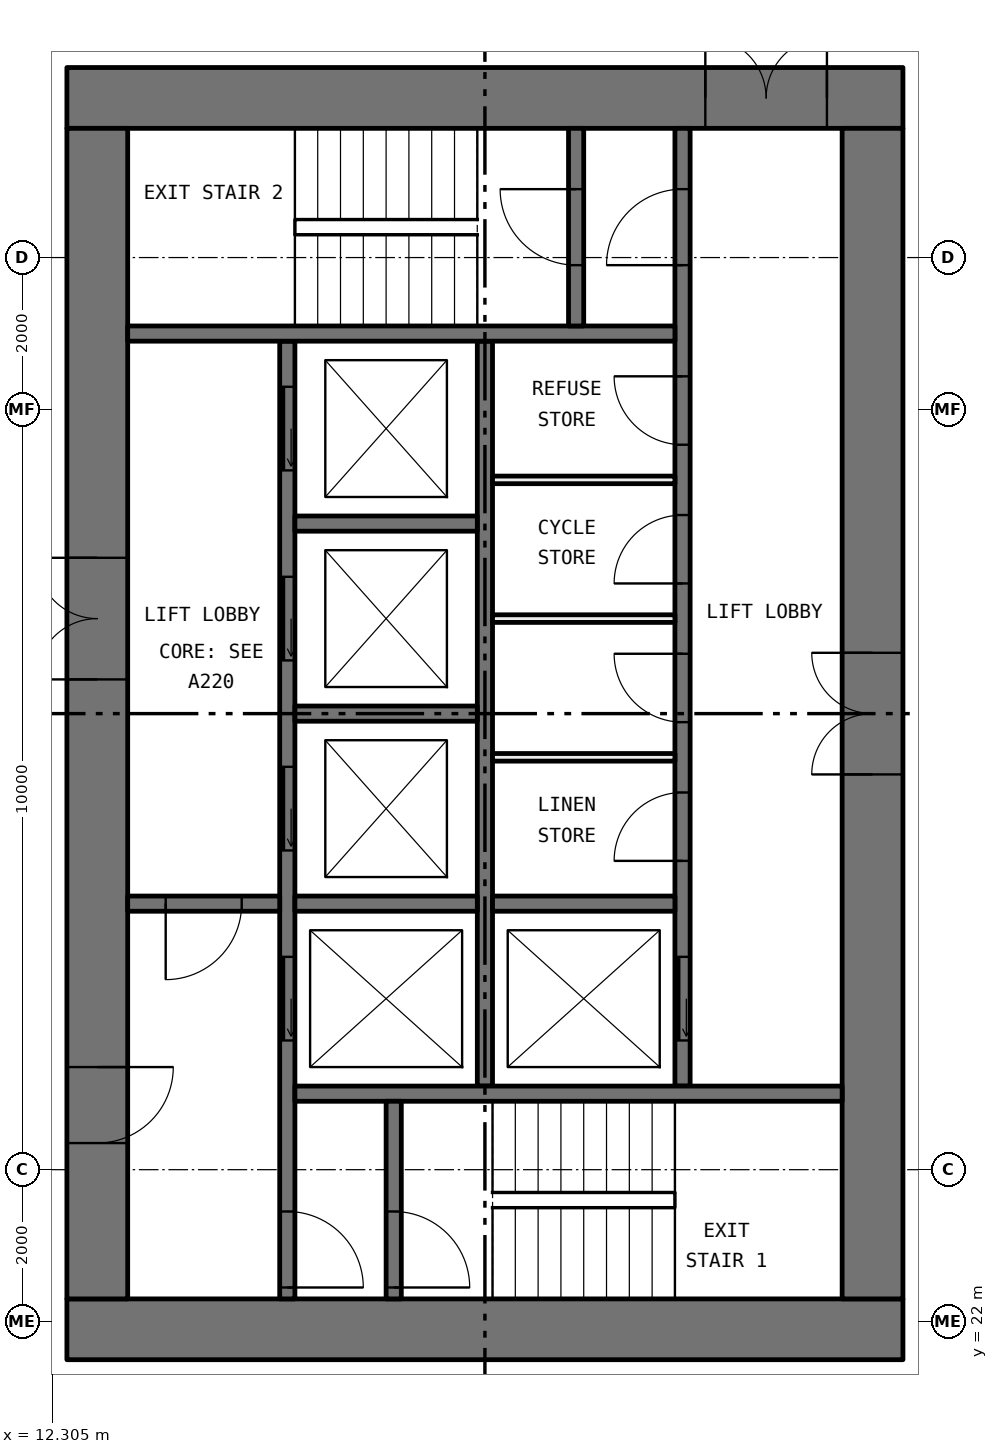
"""IFC4 building model, lengths in metres.
Left out: names, types, materials, properties, quantities, classifications, styles, units other than length and angle.
Written with IfcOpenShell. Run it as: python <this file> out.ifc"""

import sys

from ifc_helpers import new_model, si_unit, direction, frame, frame_2d, origin, place, context, subcontext, project, spatial, rectangle, extrude, element, fill, save


model = new_model("IFC4")
c1 = context("Model", 3, precision=1e-05, world=origin(), true_north=direction((0.0, 1.0)))
c2 = subcontext(c1, "Body", "Model", "MODEL_VIEW")
j1 = project(units=[si_unit("LENGTHUNIT", "METRE"), si_unit("PLANEANGLEUNIT", "RADIAN")], contexts=[c1])
p1 = place(None, origin())
s1 = spatial("IfcSite", under=j1, at=p1, CompositionType="ELEMENT")
p2 = place(p1, origin())
s2 = spatial("IfcBuilding", under=s1, at=p2, CompositionType="ELEMENT")
p3 = place(p2, frame((0.0, 0.0, 78.3)))
s3 = spatial("IfcBuildingStorey", under=s2, at=p3, CompositionType="ELEMENT", Elevation=78.3)
p4 = place(p3, frame((12.5, 21.9, 0.0), z_axis=(0.0, 0.0, 1.0), x_axis=(1.0, 0.0, 0.0)))
e1 = element("IfcWall", 1, at=p4, inside=s3, PredefinedType="SHEAR", context=c2, shape_type="SweptSolid", body=[
    extrude(rectangle(XDim=11.0, YDim=0.8, at=frame_2d((5.5, 0.0))), origin(), (0.0, 0.0, 1.0), 3.05),
])
p5 = place(p3, frame((12.5, 38.1, 0.0), z_axis=(0.0, 0.0, 1.0), x_axis=(1.0, 0.0, 0.0)))
e2 = element("IfcWall", 2, at=p5, inside=s3, PredefinedType="SHEAR", context=c2, shape_type="SweptSolid", body=[
    extrude(rectangle(XDim=11.0, YDim=0.8, at=frame_2d((5.5, 0.0))), origin(), (0.0, 0.0, 1.0), 3.05),
])
p6 = place(p5, frame((8.4, 0.0, 0.0)))
e3 = element("IfcOpeningElement", 3, at=p6, cuts=e2, PredefinedType="OPENING", context=c2, shape_type="SweptSolid", body=[
    extrude(rectangle(XDim=1.6, YDim=2.1, at=frame_2d((0.8, 1.05))), frame((0.0, 0.41, 0.0), z_axis=(0.0, -1.0, 0.0), x_axis=(1.0, 0.0, 0.0)), (0.0, 0.0, 1.0), 0.82),
])
p7 = place(p3, frame((12.9, 22.3, 0.0), z_axis=(0.0, 0.0, 1.0), x_axis=(0.0, 1.0, 0.0)))
e4 = element("IfcWall", 4, at=p7, inside=s3, PredefinedType="SHEAR", context=c2, shape_type="SweptSolid", body=[
    extrude(rectangle(XDim=15.4, YDim=0.8, at=frame_2d((7.7, 0.0))), origin(), (0.0, 0.0, 1.0), 3.05),
])
p8 = place(p7, frame((8.15, 0.0, 0.0)))
e5 = element("IfcOpeningElement", 5, at=p8, cuts=e4, PredefinedType="OPENING", context=c2, shape_type="SweptSolid", body=[
    extrude(rectangle(XDim=1.6, YDim=2.1, at=frame_2d((0.8, 1.05))), frame((0.0, 0.41, 0.0), z_axis=(0.0, -1.0, 0.0), x_axis=(1.0, 0.0, 0.0)), (0.0, 0.0, 1.0), 0.82),
])
p9 = place(p7, frame((2.05, 0.0, 0.0)))
e6 = element("IfcOpeningElement", 6, at=p9, cuts=e4, PredefinedType="OPENING", context=c2, shape_type="SweptSolid", body=[
    extrude(rectangle(XDim=1.0, YDim=2.1, at=frame_2d((0.5, 1.05))), frame((0.0, 0.41, 0.0), z_axis=(0.0, -1.0, 0.0), x_axis=(1.0, 0.0, 0.0)), (0.0, 0.0, 1.0), 0.82),
])
p10 = place(p3, frame((23.1, 22.3, 0.0), z_axis=(0.0, 0.0, 1.0), x_axis=(0.0, 1.0, 0.0)))
e7 = element("IfcWall", 7, at=p10, inside=s3, PredefinedType="SHEAR", context=c2, shape_type="SweptSolid", body=[
    extrude(rectangle(XDim=15.4, YDim=0.8, at=frame_2d((7.7, 0.0))), origin(), (0.0, 0.0, 1.0), 3.05),
])
p11 = place(p10, frame((6.9, 0.0, 0.0)))
e8 = element("IfcOpeningElement", 8, at=p11, cuts=e7, PredefinedType="OPENING", context=c2, shape_type="SweptSolid", body=[
    extrude(rectangle(XDim=1.6, YDim=2.1, at=frame_2d((0.8, 1.05))), frame((0.0, 0.41, 0.0), z_axis=(0.0, -1.0, 0.0), x_axis=(1.0, 0.0, 0.0)), (0.0, 0.0, 1.0), 0.82),
])
p12 = place(p3, frame((15.4, 22.3, 0.0), z_axis=(0.0, 0.0, 1.0), x_axis=(0.0, 1.0, 0.0)))
e9 = element("IfcWall", 9, at=p12, inside=s3, PredefinedType="SOLIDWALL", context=c2, shape_type="SweptSolid", body=[
    extrude(rectangle(XDim=12.6, YDim=0.2, at=frame_2d((6.3, 0.0))), origin(), (0.0, 0.0, 1.0), 3.05),
])
p13 = place(p12, frame((3.4, 0.0, 0.0)))
e10 = element("IfcOpeningElement", 10, at=p13, cuts=e9, PredefinedType="OPENING", context=c2, shape_type="SweptSolid", body=[
    extrude(rectangle(XDim=1.1, YDim=2.1, at=frame_2d((0.55, 1.05))), frame((0.0, 0.11, 0.0), z_axis=(0.0, -1.0, 0.0), x_axis=(1.0, 0.0, 0.0)), (0.0, 0.0, 1.0), 0.22),
])
p14 = place(p12, frame((5.9, 0.0, 0.0)))
e11 = element("IfcOpeningElement", 11, at=p14, cuts=e9, PredefinedType="OPENING", context=c2, shape_type="SweptSolid", body=[
    extrude(rectangle(XDim=1.1, YDim=2.1, at=frame_2d((0.55, 1.05))), frame((0.0, 0.11, 0.0), z_axis=(0.0, -1.0, 0.0), x_axis=(1.0, 0.0, 0.0)), (0.0, 0.0, 1.0), 0.22),
])
p15 = place(p12, frame((8.4, 0.0, 0.0)))
e12 = element("IfcOpeningElement", 12, at=p15, cuts=e9, PredefinedType="OPENING", context=c2, shape_type="SweptSolid", body=[
    extrude(rectangle(XDim=1.1, YDim=2.1, at=frame_2d((0.55, 1.05))), frame((0.0, 0.11, 0.0), z_axis=(0.0, -1.0, 0.0), x_axis=(1.0, 0.0, 0.0)), (0.0, 0.0, 1.0), 0.22),
])
p16 = place(p12, frame((10.9, 0.0, 0.0)))
e13 = element("IfcOpeningElement", 13, at=p16, cuts=e9, PredefinedType="OPENING", context=c2, shape_type="SweptSolid", body=[
    extrude(rectangle(XDim=1.1, YDim=2.1, at=frame_2d((0.55, 1.05))), frame((0.0, 0.11, 0.0), z_axis=(0.0, -1.0, 0.0), x_axis=(1.0, 0.0, 0.0)), (0.0, 0.0, 1.0), 0.22),
])
p17 = place(p12, frame((0.15, 0.0, 0.0)))
e14 = element("IfcOpeningElement", 14, at=p17, cuts=e9, PredefinedType="OPENING", context=c2, shape_type="SweptSolid", body=[
    extrude(rectangle(XDim=1.0, YDim=2.1, at=frame_2d((0.5, 1.05))), frame((0.0, 0.11, 0.0), z_axis=(0.0, -1.0, 0.0), x_axis=(1.0, 0.0, 0.0)), (0.0, 0.0, 1.0), 0.22),
])
p18 = place(p3, frame((20.6, 25.1, 0.0), z_axis=(0.0, 0.0, 1.0), x_axis=(0.0, 1.0, 0.0)))
e15 = element("IfcWall", 15, at=p18, inside=s3, PredefinedType="SOLIDWALL", context=c2, shape_type="SweptSolid", body=[
    extrude(rectangle(XDim=12.6, YDim=0.2, at=frame_2d((6.3, 0.0))), origin(), (0.0, 0.0, 1.0), 3.05),
])
p19 = place(p18, frame((0.6, 0.0, 0.0)))
e16 = element("IfcOpeningElement", 16, at=p19, cuts=e15, PredefinedType="OPENING", context=c2, shape_type="SweptSolid", body=[
    extrude(rectangle(XDim=1.1, YDim=2.1, at=frame_2d((0.55, 1.05))), frame((0.0, 0.11, 0.0), z_axis=(0.0, -1.0, 0.0), x_axis=(1.0, 0.0, 0.0)), (0.0, 0.0, 1.0), 0.22),
])
p20 = place(p18, frame((10.8, 0.0, 0.0)))
e17 = element("IfcOpeningElement", 17, at=p20, cuts=e15, PredefinedType="OPENING", context=c2, shape_type="SweptSolid", body=[
    extrude(rectangle(XDim=1.0, YDim=2.1, at=frame_2d((0.5, 1.05))), frame((0.0, 0.11, 0.0), z_axis=(0.0, -1.0, 0.0), x_axis=(1.0, 0.0, 0.0)), (0.0, 0.0, 1.0), 0.22),
])
p21 = place(p18, frame((2.962, 0.0, 0.0)))
e18 = element("IfcOpeningElement", 18, at=p21, cuts=e15, PredefinedType="OPENING", context=c2, shape_type="SweptSolid", body=[
    extrude(rectangle(XDim=0.9, YDim=2.1, at=frame_2d((0.45, 1.05))), frame((0.0, 0.11, 0.0), z_axis=(0.0, -1.0, 0.0), x_axis=(1.0, 0.0, 0.0)), (0.0, 0.0, 1.0), 0.22),
])
p22 = place(p18, frame((4.788, 0.0, 0.0)))
e19 = element("IfcOpeningElement", 19, at=p22, cuts=e15, PredefinedType="OPENING", context=c2, shape_type="SweptSolid", body=[
    extrude(rectangle(XDim=0.9, YDim=2.1, at=frame_2d((0.45, 1.05))), frame((0.0, 0.11, 0.0), z_axis=(0.0, -1.0, 0.0), x_axis=(1.0, 0.0, 0.0)), (0.0, 0.0, 1.0), 0.22),
])
p23 = place(p18, frame((6.613, 0.0, 0.0)))
e20 = element("IfcOpeningElement", 20, at=p23, cuts=e15, PredefinedType="OPENING", context=c2, shape_type="SweptSolid", body=[
    extrude(rectangle(XDim=0.9, YDim=2.1, at=frame_2d((0.45, 1.05))), frame((0.0, 0.11, 0.0), z_axis=(0.0, -1.0, 0.0), x_axis=(1.0, 0.0, 0.0)), (0.0, 0.0, 1.0), 0.22),
])
p24 = place(p18, frame((8.438, 0.0, 0.0)))
e21 = element("IfcOpeningElement", 21, at=p24, cuts=e15, PredefinedType="OPENING", context=c2, shape_type="SweptSolid", body=[
    extrude(rectangle(XDim=0.9, YDim=2.1, at=frame_2d((0.45, 1.05))), frame((0.0, 0.11, 0.0), z_axis=(0.0, -1.0, 0.0), x_axis=(1.0, 0.0, 0.0)), (0.0, 0.0, 1.0), 0.22),
])
p25 = place(p3, frame((18.0, 25.1, 0.0), z_axis=(0.0, 0.0, 1.0), x_axis=(0.0, 1.0, 0.0)))
e22 = element("IfcWall", 22, at=p25, inside=s3, PredefinedType="SOLIDWALL", context=c2, shape_type="SweptSolid", body=[
    extrude(rectangle(XDim=9.8, YDim=0.2, at=frame_2d((4.9, 0.0))), origin(), (0.0, 0.0, 1.0), 3.05),
])
for number, where, z_axis, x_axis in (
    (23, (15.5, 25.0, 0.0), (0.0, 0.0, 1.0), (1.0, 0.0, 0.0)),
    (24, (13.3, 35.0, 0.0), (0.0, 0.0, 1.0), (1.0, 0.0, 0.0)),
):
    element("IfcWall", number, at=place(p3, frame(where, z_axis=z_axis, x_axis=x_axis)), inside=s3, PredefinedType="SOLIDWALL", context=c2, shape_type="SweptSolid", body=[
        extrude(rectangle(XDim=7.2, YDim=0.2, at=frame_2d((3.6, 0.0))), origin(), (0.0, 0.0, 1.0), 3.05),
    ])
p26 = place(p3, frame((13.3, 27.5, 0.0), z_axis=(0.0, 0.0, 1.0), x_axis=(1.0, 0.0, 0.0)))
e25 = element("IfcWall", 25, at=p26, inside=s3, PredefinedType="SOLIDWALL", context=c2, shape_type="SweptSolid", body=[
    extrude(rectangle(XDim=2.0, YDim=0.2, at=frame_2d((1.0, 0.0))), origin(), (0.0, 0.0, 1.0), 3.05),
])
p27 = place(p26, frame((0.5, 0.0, 0.0)))
e26 = element("IfcOpeningElement", 26, at=p27, cuts=e25, PredefinedType="OPENING", context=c2, shape_type="SweptSolid", body=[
    extrude(rectangle(XDim=1.0, YDim=2.1, at=frame_2d((0.5, 1.05))), frame((0.0, 0.11, 0.0), z_axis=(0.0, -1.0, 0.0), x_axis=(1.0, 0.0, 0.0)), (0.0, 0.0, 1.0), 0.22),
])
p28 = place(p3, frame((16.8, 22.3, 0.0), z_axis=(0.0, 0.0, 1.0), x_axis=(0.0, 1.0, 0.0)))
e27 = element("IfcWall", 27, at=p28, inside=s3, PredefinedType="SOLIDWALL", context=c2, shape_type="SweptSolid", body=[
    extrude(rectangle(XDim=2.6, YDim=0.2, at=frame_2d((1.3, 0.0))), origin(), (0.0, 0.0, 1.0), 3.05),
])
p29 = place(p28, frame((0.15, 0.0, 0.0)))
e28 = element("IfcOpeningElement", 28, at=p29, cuts=e27, PredefinedType="OPENING", context=c2, shape_type="SweptSolid", body=[
    extrude(rectangle(XDim=1.0, YDim=2.1, at=frame_2d((0.5, 1.05))), frame((0.0, 0.11, 0.0), z_axis=(0.0, -1.0, 0.0), x_axis=(1.0, 0.0, 0.0)), (0.0, 0.0, 1.0), 0.22),
])
p30 = place(p3, frame((19.2, 35.1, 0.0), z_axis=(0.0, 0.0, 1.0), x_axis=(0.0, 1.0, 0.0)))
e29 = element("IfcWall", 29, at=p30, inside=s3, PredefinedType="SOLIDWALL", context=c2, shape_type="SweptSolid", body=[
    extrude(rectangle(XDim=2.6, YDim=0.2, at=frame_2d((1.3, 0.0))), origin(), (0.0, 0.0, 1.0), 3.05),
])
p31 = place(p30, frame((0.8, 0.0, 0.0)))
e30 = element("IfcOpeningElement", 30, at=p31, cuts=e29, PredefinedType="OPENING", context=c2, shape_type="SweptSolid", body=[
    extrude(rectangle(XDim=1.0, YDim=2.1, at=frame_2d((0.5, 1.05))), frame((0.0, 0.11, 0.0), z_axis=(0.0, -1.0, 0.0), x_axis=(1.0, 0.0, 0.0)), (0.0, 0.0, 1.0), 0.22),
])
for number, where, z_axis, x_axis in (
    (31, (15.5, 27.5, 0.0), (0.0, 0.0, 1.0), (1.0, 0.0, 0.0)),
    (32, (15.5, 30.0, 0.0), (0.0, 0.0, 1.0), (1.0, 0.0, 0.0)),
    (33, (15.5, 32.5, 0.0), (0.0, 0.0, 1.0), (1.0, 0.0, 0.0)),
    (34, (18.1, 27.5, 0.0), (0.0, 0.0, 1.0), (1.0, 0.0, 0.0)),
):
    element("IfcWall", number, at=place(p3, frame(where, z_axis=z_axis, x_axis=x_axis)), inside=s3, PredefinedType="SOLIDWALL", context=c2, shape_type="SweptSolid", body=[
        extrude(rectangle(XDim=2.4, YDim=0.2, at=frame_2d((1.2, 0.0))), origin(), (0.0, 0.0, 1.0), 3.05),
    ])
for number, where, z_axis, x_axis in (
    (35, (18.1, 29.425, 0.0), (0.0, 0.0, 1.0), (1.0, 0.0, 0.0)),
    (36, (18.1, 31.25, 0.0), (0.0, 0.0, 1.0), (1.0, 0.0, 0.0)),
    (37, (18.1, 33.075, 0.0), (0.0, 0.0, 1.0), (1.0, 0.0, 0.0)),
):
    element("IfcWall", number, at=place(p3, frame(where, z_axis=z_axis, x_axis=x_axis)), inside=s3, PredefinedType="PARTITIONING", context=c2, shape_type="SweptSolid", body=[
        extrude(rectangle(XDim=2.4, YDim=0.1, at=frame_2d((1.2, 0.0))), origin(), (0.0, 0.0, 1.0), 3.05),
    ])
p32 = place(p19, origin())
e38 = element("IfcDoor", 38, at=p32, inside=s3, OperationType="SLIDING_TO_LEFT", PredefinedType="DOOR", context=c2, shape_type="SweptSolid", body=[
    extrude(rectangle(XDim=1.1, YDim=2.1, at=frame_2d((0.55, 1.05))), frame((0.0, 0.025, 0.0), z_axis=(0.0, -1.0, 0.0), x_axis=(1.0, 0.0, 0.0)), (0.0, 0.0, 1.0), 0.05),
])
fill(e16, e38)
p33 = place(p13, origin())
e39 = element("IfcDoor", 39, at=p33, inside=s3, OperationType="SLIDING_TO_LEFT", PredefinedType="DOOR", context=c2, shape_type="SweptSolid", body=[
    extrude(rectangle(XDim=1.1, YDim=2.1, at=frame_2d((0.55, 1.05))), frame((0.0, 0.025, 0.0), z_axis=(0.0, -1.0, 0.0), x_axis=(1.0, 0.0, 0.0)), (0.0, 0.0, 1.0), 0.05),
])
fill(e10, e39)
p34 = place(p14, origin())
e40 = element("IfcDoor", 40, at=p34, inside=s3, OperationType="SLIDING_TO_LEFT", PredefinedType="DOOR", context=c2, shape_type="SweptSolid", body=[
    extrude(rectangle(XDim=1.1, YDim=2.1, at=frame_2d((0.55, 1.05))), frame((0.0, 0.025, 0.0), z_axis=(0.0, -1.0, 0.0), x_axis=(1.0, 0.0, 0.0)), (0.0, 0.0, 1.0), 0.05),
])
fill(e11, e40)
p35 = place(p15, origin())
e41 = element("IfcDoor", 41, at=p35, inside=s3, OperationType="SLIDING_TO_LEFT", PredefinedType="DOOR", context=c2, shape_type="SweptSolid", body=[
    extrude(rectangle(XDim=1.1, YDim=2.1, at=frame_2d((0.55, 1.05))), frame((0.0, 0.025, 0.0), z_axis=(0.0, -1.0, 0.0), x_axis=(1.0, 0.0, 0.0)), (0.0, 0.0, 1.0), 0.05),
])
fill(e12, e41)
p36 = place(p16, origin())
e42 = element("IfcDoor", 42, at=p36, inside=s3, OperationType="SLIDING_TO_LEFT", PredefinedType="DOOR", context=c2, shape_type="SweptSolid", body=[
    extrude(rectangle(XDim=1.1, YDim=2.1, at=frame_2d((0.55, 1.05))), frame((0.0, 0.025, 0.0), z_axis=(0.0, -1.0, 0.0), x_axis=(1.0, 0.0, 0.0)), (0.0, 0.0, 1.0), 0.05),
])
fill(e13, e42)
p37 = place(p29, frame((1.0, 0.0, 0.0), x_axis=(-1.0, 0.0, 0.0)))
e43 = element("IfcDoor", 43, at=p37, inside=s3, OperationType="SINGLE_SWING_LEFT", PredefinedType="DOOR", context=c2, shape_type="SweptSolid", body=[
    extrude(rectangle(XDim=1.0, YDim=2.1, at=frame_2d((0.5, 1.05))), frame((0.0, 0.025, 0.0), z_axis=(0.0, -1.0, 0.0), x_axis=(1.0, 0.0, 0.0)), (0.0, 0.0, 1.0), 0.05),
])
fill(e28, e43)
p38 = place(p17, frame((1.0, 0.0, 0.0), x_axis=(-1.0, 0.0, 0.0)))
e44 = element("IfcDoor", 44, at=p38, inside=s3, OperationType="SINGLE_SWING_LEFT", PredefinedType="DOOR", context=c2, shape_type="SweptSolid", body=[
    extrude(rectangle(XDim=1.0, YDim=2.1, at=frame_2d((0.5, 1.05))), frame((0.0, 0.025, 0.0), z_axis=(0.0, -1.0, 0.0), x_axis=(1.0, 0.0, 0.0)), (0.0, 0.0, 1.0), 0.05),
])
fill(e14, e44)
p39 = place(p20, origin())
e45 = element("IfcDoor", 45, at=p39, inside=s3, OperationType="SINGLE_SWING_RIGHT", PredefinedType="DOOR", context=c2, shape_type="SweptSolid", body=[
    extrude(rectangle(XDim=1.0, YDim=2.1, at=frame_2d((0.5, 1.05))), frame((0.0, 0.025, 0.0), z_axis=(0.0, -1.0, 0.0), x_axis=(1.0, 0.0, 0.0)), (0.0, 0.0, 1.0), 0.05),
])
fill(e17, e45)
p40 = place(p31, origin())
e46 = element("IfcDoor", 46, at=p40, inside=s3, OperationType="SINGLE_SWING_LEFT", PredefinedType="DOOR", context=c2, shape_type="SweptSolid", body=[
    extrude(rectangle(XDim=1.0, YDim=2.1, at=frame_2d((0.5, 1.05))), frame((0.0, 0.025, 0.0), z_axis=(0.0, -1.0, 0.0), x_axis=(1.0, 0.0, 0.0)), (0.0, 0.0, 1.0), 0.05),
])
fill(e30, e46)
p41 = place(p27, frame((1.0, 0.0, 0.0), x_axis=(-1.0, 0.0, 0.0)))
e47 = element("IfcDoor", 47, at=p41, inside=s3, OperationType="SINGLE_SWING_LEFT", PredefinedType="DOOR", context=c2, shape_type="SweptSolid", body=[
    extrude(rectangle(XDim=1.0, YDim=2.1, at=frame_2d((0.5, 1.05))), frame((0.0, 0.025, 0.0), z_axis=(0.0, -1.0, 0.0), x_axis=(1.0, 0.0, 0.0)), (0.0, 0.0, 1.0), 0.05),
])
fill(e26, e47)
p42 = place(p8, origin())
e48 = element("IfcDoor", 48, at=p42, inside=s3, OperationType="DOUBLE_DOOR_SINGLE_SWING", PredefinedType="DOOR", context=c2, shape_type="SweptSolid", body=[
    extrude(rectangle(XDim=1.6, YDim=2.1, at=frame_2d((0.8, 1.05))), frame((0.0, 0.025, 0.0), z_axis=(0.0, -1.0, 0.0), x_axis=(1.0, 0.0, 0.0)), (0.0, 0.0, 1.0), 0.05),
])
fill(e5, e48)
p43 = place(p9, frame((1.0, 0.0, 0.0), x_axis=(-1.0, 0.0, 0.0)))
e49 = element("IfcDoor", 49, at=p43, inside=s3, OperationType="SINGLE_SWING_RIGHT", PredefinedType="DOOR", context=c2, shape_type="SweptSolid", body=[
    extrude(rectangle(XDim=1.0, YDim=2.1, at=frame_2d((0.5, 1.05))), frame((0.0, 0.025, 0.0), z_axis=(0.0, -1.0, 0.0), x_axis=(1.0, 0.0, 0.0)), (0.0, 0.0, 1.0), 0.05),
])
fill(e6, e49)
p44 = place(p6, origin())
e50 = element("IfcDoor", 50, at=p44, inside=s3, OperationType="DOUBLE_DOOR_SINGLE_SWING", PredefinedType="DOOR", context=c2, shape_type="SweptSolid", body=[
    extrude(rectangle(XDim=1.6, YDim=2.1, at=frame_2d((0.8, 1.05))), frame((0.0, 0.025, 0.0), z_axis=(0.0, -1.0, 0.0), x_axis=(1.0, 0.0, 0.0)), (0.0, 0.0, 1.0), 0.05),
])
fill(e3, e50)
p45 = place(p11, origin())
e51 = element("IfcDoor", 51, at=p45, inside=s3, OperationType="DOUBLE_DOOR_SINGLE_SWING", PredefinedType="DOOR", context=c2, shape_type="SweptSolid", body=[
    extrude(rectangle(XDim=1.6, YDim=2.1, at=frame_2d((0.8, 1.05))), frame((0.0, 0.025, 0.0), z_axis=(0.0, -1.0, 0.0), x_axis=(1.0, 0.0, 0.0)), (0.0, 0.0, 1.0), 0.05),
])
fill(e8, e51)
p46 = place(p21, origin())
e52 = element("IfcDoor", 52, at=p46, inside=s3, OperationType="SINGLE_SWING_RIGHT", PredefinedType="DOOR", context=c2, shape_type="SweptSolid", body=[
    extrude(rectangle(XDim=0.9, YDim=2.1, at=frame_2d((0.45, 1.05))), frame((0.0, 0.025, 0.0), z_axis=(0.0, -1.0, 0.0), x_axis=(1.0, 0.0, 0.0)), (0.0, 0.0, 1.0), 0.05),
])
fill(e18, e52)
p47 = place(p22, origin())
e53 = element("IfcDoor", 53, at=p47, inside=s3, OperationType="SINGLE_SWING_LEFT", PredefinedType="DOOR", context=c2, shape_type="SweptSolid", body=[
    extrude(rectangle(XDim=0.9, YDim=2.1, at=frame_2d((0.45, 1.05))), frame((0.0, 0.025, 0.0), z_axis=(0.0, -1.0, 0.0), x_axis=(1.0, 0.0, 0.0)), (0.0, 0.0, 1.0), 0.05),
])
fill(e19, e53)
p48 = place(p23, origin())
e54 = element("IfcDoor", 54, at=p48, inside=s3, OperationType="SINGLE_SWING_RIGHT", PredefinedType="DOOR", context=c2, shape_type="SweptSolid", body=[
    extrude(rectangle(XDim=0.9, YDim=2.1, at=frame_2d((0.45, 1.05))), frame((0.0, 0.025, 0.0), z_axis=(0.0, -1.0, 0.0), x_axis=(1.0, 0.0, 0.0)), (0.0, 0.0, 1.0), 0.05),
])
fill(e20, e54)
p49 = place(p24, origin())
e55 = element("IfcDoor", 55, at=p49, inside=s3, OperationType="SINGLE_SWING_LEFT", PredefinedType="DOOR", context=c2, shape_type="SweptSolid", body=[
    extrude(rectangle(XDim=0.9, YDim=2.1, at=frame_2d((0.45, 1.05))), frame((0.0, 0.025, 0.0), z_axis=(0.0, -1.0, 0.0), x_axis=(1.0, 0.0, 0.0)), (0.0, 0.0, 1.0), 0.05),
])
fill(e21, e55)
save(model, sys.argv[1])
